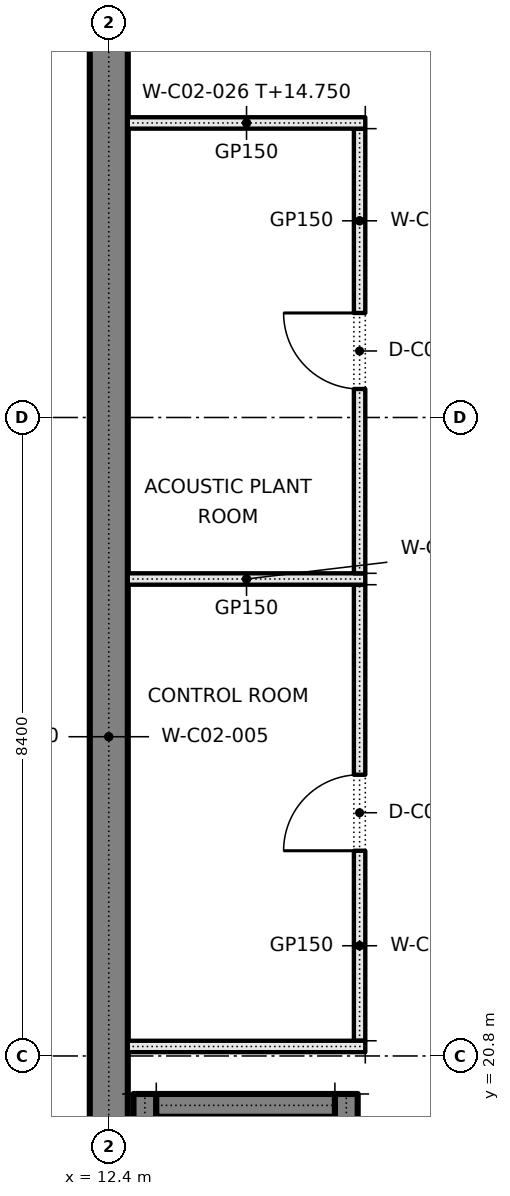
"""IFC4 building model, lengths in metres.
Left out: names, types, materials, properties, quantities, classifications, styles, units other than length and angle.
Written with IfcOpenShell. Run it as: python <this file> out.ifc"""

import sys

from ifc_helpers import new_model, si_unit, direction, frame, frame_2d, origin, place, context, subcontext, project, spatial, rectangle, extrude, element, fill, save


model = new_model("IFC4")
c1 = context("Model", 3, precision=1e-05, world=origin(), true_north=direction((0.0, 1.0)))
c2 = subcontext(c1, "Body", "Model", "MODEL_VIEW")
j1 = project(units=[si_unit("LENGTHUNIT", "METRE"), si_unit("PLANEANGLEUNIT", "RADIAN")], contexts=[c1])
p1 = place(None, origin())
s1 = spatial("IfcSite", under=j1, at=p1, CompositionType="ELEMENT")
p2 = place(p1, origin())
s2 = spatial("IfcBuilding", under=s1, at=p2, CompositionType="ELEMENT")
p3 = place(p2, frame((0.0, 0.0, 10.2)))
s3 = spatial("IfcBuildingStorey", under=s2, at=p3, CompositionType="ELEMENT", Elevation=10.2)
p4 = place(p3, frame((12.875, 17.5, 0.0), z_axis=(0.0, 0.0, 1.0), x_axis=(0.0, 1.0, 0.0)))
e1 = element("IfcWall", 1, at=p4, inside=s3, PredefinedType="SOLIDWALL", context=c2, shape_type="SweptSolid", body=[
    extrude(rectangle(XDim=2.8, YDim=0.3, at=frame_2d((1.4, 0.0))), origin(), (0.0, 0.0, 1.0), 3.9),
])
p5 = place(p3, frame((15.525, 17.5, 0.0), z_axis=(0.0, 0.0, 1.0), x_axis=(0.0, 1.0, 0.0)))
e2 = element("IfcWall", 2, at=p5, inside=s3, PredefinedType="SOLIDWALL", context=c2, shape_type="SweptSolid", body=[
    extrude(rectangle(XDim=2.8, YDim=0.3, at=frame_2d((1.4, 0.0))), origin(), (0.0, 0.0, 1.0), 3.9),
])
p6 = place(p5, frame((0.8, 0.0, 0.0)))
e3 = element("IfcOpeningElement", 3, at=p6, cuts=e2, PredefinedType="OPENING", context=c2, shape_type="SweptSolid", body=[
    extrude(rectangle(XDim=1.2, YDim=2.1, at=frame_2d((0.6, 1.05))), frame((0.0, 0.16, 0.0), z_axis=(0.0, -1.0, 0.0), x_axis=(1.0, 0.0, 0.0)), (0.0, 0.0, 1.0), 0.32),
])
p7 = place(p3, frame((13.025, 20.15, 0.0), z_axis=(0.0, 0.0, 1.0), x_axis=(1.0, 0.0, 0.0)))
e4 = element("IfcWall", 4, at=p7, inside=s3, PredefinedType="SOLIDWALL", context=c2, shape_type="SweptSolid", body=[
    extrude(rectangle(XDim=2.35, YDim=0.3, at=frame_2d((1.175, 0.0))), origin(), (0.0, 0.0, 1.0), 3.9),
])
p8 = place(p3, frame((12.4, 3.75, 0.0), z_axis=(0.0, 0.0, 1.0), x_axis=(0.0, 1.0, 0.0)))
e5 = element("IfcWall", 5, at=p8, inside=s3, PredefinedType="SOLIDWALL", context=c2, shape_type="SweptSolid", body=[
    extrude(rectangle(XDim=42.5, YDim=0.5, at=frame_2d((21.25, 0.0))), origin(), (0.0, 0.0, 1.0), 4.8),
])
p9 = place(p3, frame((15.7, 21.0, 0.0), z_axis=(0.0, 0.0, 1.0), x_axis=(0.0, 1.0, 0.0)))
e6 = element("IfcWall", 6, at=p9, inside=s3, PredefinedType="PARTITIONING", context=c2, shape_type="SweptSolid", body=[
    extrude(rectangle(XDim=6.0, YDim=0.15, at=frame_2d((3.0, 0.0))), origin(), (0.0, 0.0, 1.0), 4.55),
])
p10 = place(p9, frame((2.5, 0.0, 0.0)))
e7 = element("IfcOpeningElement", 7, at=p10, cuts=e6, PredefinedType="OPENING", context=c2, shape_type="SweptSolid", body=[
    extrude(rectangle(XDim=1.0, YDim=2.1, at=frame_2d((0.5, 1.05))), frame((0.0, 0.085, 0.0), z_axis=(0.0, -1.0, 0.0), x_axis=(1.0, 0.0, 0.0)), (0.0, 0.0, 1.0), 0.17),
])
for number, where, z_axis, x_axis in (
    (8, (12.65, 20.925, 0.0), (0.0, 0.0, 1.0), (1.0, 0.0, 0.0)),
    (9, (12.65, 27.075, 0.0), (0.0, 0.0, 1.0), (1.0, 0.0, 0.0)),
):
    element("IfcWall", number, at=place(p3, frame(where, z_axis=z_axis, x_axis=x_axis)), inside=s3, PredefinedType="PARTITIONING", context=c2, shape_type="SweptSolid", body=[
        extrude(rectangle(XDim=3.125, YDim=0.15, at=frame_2d((1.562, 0.0))), origin(), (0.0, 0.0, 1.0), 4.55),
    ])
p11 = place(p3, frame((15.7, 27.15, 0.0), z_axis=(0.0, 0.0, 1.0), x_axis=(0.0, 1.0, 0.0)))
e10 = element("IfcWall", 10, at=p11, inside=s3, PredefinedType="PARTITIONING", context=c2, shape_type="SweptSolid", body=[
    extrude(rectangle(XDim=5.85, YDim=0.15, at=frame_2d((2.925, 0.0))), origin(), (0.0, 0.0, 1.0), 4.55),
])
p12 = place(p11, frame((2.425, 0.0, 0.0)))
e11 = element("IfcOpeningElement", 11, at=p12, cuts=e10, PredefinedType="OPENING", context=c2, shape_type="SweptSolid", body=[
    extrude(rectangle(XDim=1.0, YDim=2.1, at=frame_2d((0.5, 1.05))), frame((0.0, 0.085, 0.0), z_axis=(0.0, -1.0, 0.0), x_axis=(1.0, 0.0, 0.0)), (0.0, 0.0, 1.0), 0.17),
])
p13 = place(p3, frame((12.65, 33.075, 0.0), z_axis=(0.0, 0.0, 1.0), x_axis=(1.0, 0.0, 0.0)))
e12 = element("IfcWall", 12, at=p13, inside=s3, PredefinedType="PARTITIONING", context=c2, shape_type="SweptSolid", body=[
    extrude(rectangle(XDim=3.125, YDim=0.15, at=frame_2d((1.562, 0.0))), origin(), (0.0, 0.0, 1.0), 4.55),
])
p14 = place(p10, origin())
e13 = element("IfcDoor", 13, at=p14, inside=s3, OperationType="SINGLE_SWING_LEFT", PredefinedType="DOOR", context=c2, shape_type="SweptSolid", body=[
    extrude(rectangle(XDim=1.0, YDim=2.1, at=frame_2d((0.5, 1.05))), frame((0.0, 0.025, 0.0), z_axis=(0.0, -1.0, 0.0), x_axis=(1.0, 0.0, 0.0)), (0.0, 0.0, 1.0), 0.05),
])
fill(e7, e13)
p15 = place(p12, origin())
e14 = element("IfcDoor", 14, at=p15, inside=s3, OperationType="SINGLE_SWING_RIGHT", PredefinedType="DOOR", context=c2, shape_type="SweptSolid", body=[
    extrude(rectangle(XDim=1.0, YDim=2.1, at=frame_2d((0.5, 1.05))), frame((0.0, 0.025, 0.0), z_axis=(0.0, -1.0, 0.0), x_axis=(1.0, 0.0, 0.0)), (0.0, 0.0, 1.0), 0.05),
])
fill(e11, e14)
save(model, sys.argv[1])
